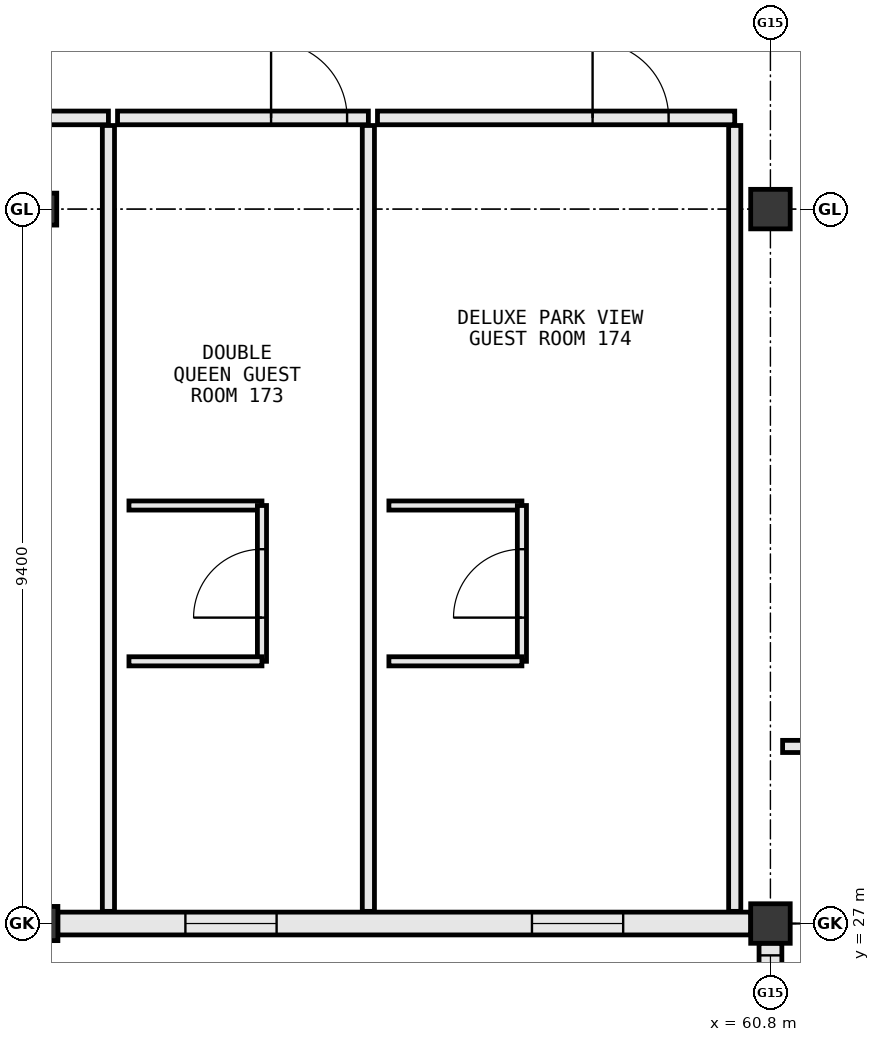
"""IFC4 building model, lengths in metres.
Left out: names, types, materials, properties, quantities, classifications, styles, units other than length and angle.
Written with IfcOpenShell. Run it as: python <this file> out.ifc"""

import sys

from ifc_helpers import new_model, si_unit, direction, frame, frame_2d, origin, origin_2d, place, context, subcontext, project, spatial, rectangle, extrude, element, fill, save


model = new_model("IFC4")
c1 = context("Model", 3, precision=1e-05, world=origin(), true_north=direction((0.0, 1.0)))
c2 = subcontext(c1, "Body", "Model", "MODEL_VIEW")
j1 = project(units=[si_unit("LENGTHUNIT", "METRE"), si_unit("PLANEANGLEUNIT", "RADIAN")], contexts=[c1])
p1 = place(None, origin())
s1 = spatial("IfcSite", under=j1, at=p1, CompositionType="ELEMENT")
p2 = place(p1, origin())
s2 = spatial("IfcBuilding", under=s1, at=p2, CompositionType="ELEMENT")
p3 = place(p2, frame((0.0, 0.0, 23.8)))
s3 = spatial("IfcBuildingStorey", under=s2, at=p3, CompositionType="ELEMENT", Elevation=23.8)
for number, where, z_axis, x_axis in (
    (1, (60.8, 27.0, 0.0), (0.0, 0.0, 1.0), (1.0, 0.0, 0.0)),
    (2, (60.8, 36.4, 0.0), (0.0, 0.0, 1.0), (1.0, 0.0, 0.0)),
):
    element("IfcColumn", number, at=place(p3, frame(where, z_axis=z_axis, x_axis=x_axis)), inside=s3, PredefinedType="COLUMN", context=c2, shape_type="SweptSolid", body=[
        extrude(rectangle(XDim=0.52, YDim=0.52, at=origin_2d()), origin(), (0.0, 0.0, 1.0), 3.8),
    ])
p4 = place(p3, frame((51.2, 27.0, 0.0), z_axis=(0.0, 0.0, 1.0), x_axis=(1.0, 0.0, 0.0)))
e3 = element("IfcColumn", 3, at=p4, inside=s3, PredefinedType="COLUMN", context=c2, shape_type="SweptSolid", body=[
    extrude(rectangle(XDim=0.45, YDim=0.45, at=origin_2d()), origin(), (0.0, 0.0, 1.0), 3.8),
])
p5 = place(p3, frame((51.2, 36.4, 0.0), z_axis=(0.0, 0.0, 1.0), x_axis=(1.0, 0.0, 0.0)))
e4 = element("IfcColumn", 4, at=p5, inside=s3, PredefinedType="COLUMN", context=c2, shape_type="SweptSolid", body=[
    extrude(rectangle(XDim=0.42, YDim=0.42, at=origin_2d()), origin(), (0.0, 0.0, 1.0), 3.8),
])
p6 = place(p3, frame((51.423, 27.0, 0.0), z_axis=(0.0, 0.0, 1.0), x_axis=(1.0, 0.0, 0.0)))
e5 = element("IfcWall", 5, at=p6, inside=s3, PredefinedType="STANDARD", context=c2, shape_type="SweptSolid", body=[
    extrude(rectangle(XDim=9.119, YDim=0.3, at=frame_2d((4.56, 0.0))), origin(), (0.0, 0.0, 1.0), 2.785),
])
p7 = place(p6, frame((1.68, 0.0, 0.85)))
e6 = element("IfcOpeningElement", 6, at=p7, cuts=e5, PredefinedType="OPENING", context=c2, shape_type="SweptSolid", body=[
    extrude(rectangle(XDim=1.2, YDim=1.55, at=frame_2d((0.6, 0.775))), frame((0.0, 0.162, 0.0), z_axis=(0.0, -1.0, 0.0), x_axis=(1.0, 0.0, 0.0)), (0.0, 0.0, 1.0), 0.324),
])
p8 = place(p6, frame((6.239, 0.0, 0.85)))
e7 = element("IfcOpeningElement", 7, at=p8, cuts=e5, PredefinedType="OPENING", context=c2, shape_type="SweptSolid", body=[
    extrude(rectangle(XDim=1.2, YDim=1.55, at=frame_2d((0.6, 0.775))), frame((0.0, 0.162, 0.0), z_axis=(0.0, -1.0, 0.0), x_axis=(1.0, 0.0, 0.0)), (0.0, 0.0, 1.0), 0.324),
])
p9 = place(p3, frame((60.8, 26.742, 0.0), z_axis=(0.0, 0.0, 1.0), x_axis=(0.0, -1.0, 0.0)))
e8 = element("IfcWall", 8, at=p9, inside=s3, PredefinedType="STANDARD", context=c2, shape_type="SweptSolid", body=[
    extrude(rectangle(XDim=7.884, YDim=0.3, at=frame_2d((3.942, 0.0))), origin(), (0.0, 0.0, 1.0), 3.005),
])
p10 = place(p9, frame((5.498, 0.0, 0.85)))
e9 = element("IfcOpeningElement", 9, at=p10, cuts=e8, PredefinedType="OPENING", context=c2, shape_type="SweptSolid", body=[
    extrude(rectangle(XDim=1.8, YDim=1.85, at=frame_2d((0.9, 0.925))), frame((0.0, 0.162, 0.0), z_axis=(0.0, -1.0, 0.0), x_axis=(1.0, 0.0, 0.0)), (0.0, 0.0, 1.0), 0.324),
])
p11 = place(p9, frame((2.242, 0.0, 0.85)))
e10 = element("IfcOpeningElement", 10, at=p11, cuts=e8, PredefinedType="OPENING", context=c2, shape_type="SweptSolid", body=[
    extrude(rectangle(XDim=1.8, YDim=1.85, at=frame_2d((0.9, 0.925))), frame((0.0, 0.162, 0.0), z_axis=(0.0, -1.0, 0.0), x_axis=(1.0, 0.0, 0.0)), (0.0, 0.0, 1.0), 0.324),
])
p12 = place(p9, frame((0.161, 0.0, 0.85)))
e11 = element("IfcOpeningElement", 11, at=p12, cuts=e8, PredefinedType="OPENING", context=c2, shape_type="SweptSolid", body=[
    extrude(rectangle(XDim=1.05, YDim=1.45, at=frame_2d((0.525, 0.725))), frame((0.0, 0.162, 0.0), z_axis=(0.0, -1.0, 0.0), x_axis=(1.0, 0.0, 0.0)), (0.0, 0.0, 1.0), 0.324),
])
p13 = place(p3, frame((60.96, 29.33, 0.0), z_axis=(0.0, 0.0, 1.0), x_axis=(1.0, 0.0, 0.0)))
e12 = element("IfcWall", 12, at=p13, inside=s3, PredefinedType="PARTITIONING", context=c2, shape_type="SweptSolid", body=[
    extrude(rectangle(XDim=6.94, YDim=0.16, at=frame_2d((3.47, 0.0))), origin(), (0.0, 0.0, 1.0), 3.55),
])
p14 = place(p3, frame((52.09, 37.6, 0.0), z_axis=(0.0, 0.0, 1.0), x_axis=(-1.0, 0.0, 0.0)))
e13 = element("IfcWall", 13, at=p14, inside=s3, PredefinedType="PARTITIONING", context=c2, shape_type="SweptSolid", body=[
    extrude(rectangle(XDim=3.3, YDim=0.18, at=frame_2d((1.65, 0.0))), origin(), (0.0, 0.0, 1.0), 3.55),
])
p15 = place(p14, frame((1.717, 0.0, 0.0)))
e14 = element("IfcOpeningElement", 14, at=p15, cuts=e13, PredefinedType="OPENING", context=c2, shape_type="SweptSolid", body=[
    extrude(rectangle(XDim=1.0, YDim=2.2, at=frame_2d((0.5, 1.1))), frame((0.0, 0.102, 0.0), z_axis=(0.0, -1.0, 0.0), x_axis=(1.0, 0.0, 0.0)), (0.0, 0.0, 1.0), 0.204),
])
p16 = place(p3, frame((52.09, 27.16, 0.0), z_axis=(0.0, 0.0, 1.0), x_axis=(0.0, 1.0, 0.0)))
e15 = element("IfcWall", 15, at=p16, inside=s3, PredefinedType="PARTITIONING", context=c2, shape_type="SweptSolid", body=[
    extrude(rectangle(XDim=10.34, YDim=0.16, at=frame_2d((5.17, 0.0))), origin(), (0.0, 0.0, 1.0), 3.55),
])
p17 = place(p3, frame((55.51, 37.6, 0.0), z_axis=(0.0, 0.0, 1.0), x_axis=(-1.0, 0.0, 0.0)))
e16 = element("IfcWall", 16, at=p17, inside=s3, PredefinedType="PARTITIONING", context=c2, shape_type="SweptSolid", body=[
    extrude(rectangle(XDim=3.3, YDim=0.18, at=frame_2d((1.65, 0.0))), origin(), (0.0, 0.0, 1.0), 3.55),
])
p18 = place(p17, frame((0.28, 0.0, 0.0)))
e17 = element("IfcOpeningElement", 17, at=p18, cuts=e16, PredefinedType="OPENING", context=c2, shape_type="SweptSolid", body=[
    extrude(rectangle(XDim=1.0, YDim=2.2, at=frame_2d((0.5, 1.1))), frame((0.0, 0.102, 0.0), z_axis=(0.0, -1.0, 0.0), x_axis=(1.0, 0.0, 0.0)), (0.0, 0.0, 1.0), 0.204),
])
p19 = place(p3, frame((55.51, 27.16, 0.0), z_axis=(0.0, 0.0, 1.0), x_axis=(0.0, 1.0, 0.0)))
e18 = element("IfcWall", 18, at=p19, inside=s3, PredefinedType="PARTITIONING", context=c2, shape_type="SweptSolid", body=[
    extrude(rectangle(XDim=10.34, YDim=0.16, at=frame_2d((5.17, 0.0))), origin(), (0.0, 0.0, 1.0), 3.55),
])
p20 = place(p3, frame((52.36, 32.5, 0.0), z_axis=(0.0, 0.0, 1.0), x_axis=(1.0, 0.0, 0.0)))
e19 = element("IfcWall", 19, at=p20, inside=s3, PredefinedType="PARTITIONING", context=c2, shape_type="SweptSolid", body=[
    extrude(rectangle(XDim=1.75, YDim=0.12, at=frame_2d((0.875, 0.0))), origin(), (0.0, 0.0, 1.0), 3.55),
])
p21 = place(p3, frame((54.11, 30.45, 0.0), z_axis=(0.0, 0.0, 1.0), x_axis=(0.0, 1.0, 0.0)))
e20 = element("IfcWall", 20, at=p21, inside=s3, PredefinedType="PARTITIONING", context=c2, shape_type="SweptSolid", body=[
    extrude(rectangle(XDim=2.05, YDim=0.12, at=frame_2d((1.025, 0.0))), origin(), (0.0, 0.0, 1.0), 3.095),
])
p22 = place(p21, frame((0.575, 0.0, 0.0)))
e21 = element("IfcOpeningElement", 21, at=p22, cuts=e20, PredefinedType="OPENING", context=c2, shape_type="SweptSolid", body=[
    extrude(rectangle(XDim=0.9, YDim=2.15, at=frame_2d((0.45, 1.075))), frame((0.0, 0.072, 0.0), z_axis=(0.0, -1.0, 0.0), x_axis=(1.0, 0.0, 0.0)), (0.0, 0.0, 1.0), 0.144),
])
p23 = place(p3, frame((52.36, 30.45, 0.0), z_axis=(0.0, 0.0, 1.0), x_axis=(1.0, 0.0, 0.0)))
e22 = element("IfcWall", 22, at=p23, inside=s3, PredefinedType="PARTITIONING", context=c2, shape_type="SweptSolid", body=[
    extrude(rectangle(XDim=1.75, YDim=0.12, at=frame_2d((0.875, 0.0))), origin(), (0.0, 0.0, 1.0), 3.55),
])
p24 = place(p3, frame((60.33, 37.6, 0.0), z_axis=(0.0, 0.0, 1.0), x_axis=(-1.0, 0.0, 0.0)))
e23 = element("IfcWall", 23, at=p24, inside=s3, PredefinedType="PARTITIONING", context=c2, shape_type="SweptSolid", body=[
    extrude(rectangle(XDim=4.7, YDim=0.18, at=frame_2d((2.35, 0.0))), origin(), (0.0, 0.0, 1.0), 3.55),
])
p25 = place(p24, frame((0.87, 0.0, 0.0)))
e24 = element("IfcOpeningElement", 24, at=p25, cuts=e23, PredefinedType="OPENING", context=c2, shape_type="SweptSolid", body=[
    extrude(rectangle(XDim=1.0, YDim=2.2, at=frame_2d((0.5, 1.1))), frame((0.0, 0.102, 0.0), z_axis=(0.0, -1.0, 0.0), x_axis=(1.0, 0.0, 0.0)), (0.0, 0.0, 1.0), 0.204),
])
p26 = place(p3, frame((60.33, 27.16, 0.0), z_axis=(0.0, 0.0, 1.0), x_axis=(0.0, 1.0, 0.0)))
e25 = element("IfcWall", 25, at=p26, inside=s3, PredefinedType="PARTITIONING", context=c2, shape_type="SweptSolid", body=[
    extrude(rectangle(XDim=10.34, YDim=0.16, at=frame_2d((5.17, 0.0))), origin(), (0.0, 0.0, 1.0), 3.55),
])
p27 = place(p3, frame((55.78, 32.5, 0.0), z_axis=(0.0, 0.0, 1.0), x_axis=(1.0, 0.0, 0.0)))
e26 = element("IfcWall", 26, at=p27, inside=s3, PredefinedType="PARTITIONING", context=c2, shape_type="SweptSolid", body=[
    extrude(rectangle(XDim=1.75, YDim=0.12, at=frame_2d((0.875, 0.0))), origin(), (0.0, 0.0, 1.0), 3.55),
])
p28 = place(p3, frame((57.53, 30.45, 0.0), z_axis=(0.0, 0.0, 1.0), x_axis=(0.0, 1.0, 0.0)))
e27 = element("IfcWall", 27, at=p28, inside=s3, PredefinedType="PARTITIONING", context=c2, shape_type="SweptSolid", body=[
    extrude(rectangle(XDim=2.05, YDim=0.12, at=frame_2d((1.025, 0.0))), origin(), (0.0, 0.0, 1.0), 3.095),
])
p29 = place(p28, frame((0.575, 0.0, 0.0)))
e28 = element("IfcOpeningElement", 28, at=p29, cuts=e27, PredefinedType="OPENING", context=c2, shape_type="SweptSolid", body=[
    extrude(rectangle(XDim=0.9, YDim=2.15, at=frame_2d((0.45, 1.075))), frame((0.0, 0.072, 0.0), z_axis=(0.0, -1.0, 0.0), x_axis=(1.0, 0.0, 0.0)), (0.0, 0.0, 1.0), 0.144),
])
p30 = place(p3, frame((55.78, 30.45, 0.0), z_axis=(0.0, 0.0, 1.0), x_axis=(1.0, 0.0, 0.0)))
e29 = element("IfcWall", 29, at=p30, inside=s3, PredefinedType="PARTITIONING", context=c2, shape_type="SweptSolid", body=[
    extrude(rectangle(XDim=1.75, YDim=0.12, at=frame_2d((0.875, 0.0))), origin(), (0.0, 0.0, 1.0), 3.55),
])
p31 = place(p7, origin())
e30 = element("IfcWindow", 30, at=p31, inside=s3, PartitioningType="SINGLE_PANEL", PredefinedType="WINDOW", context=c2, shape_type="SweptSolid", body=[
    extrude(rectangle(XDim=1.2, YDim=1.55, at=frame_2d((0.6, 0.775))), frame((0.0, 0.03, 0.0), z_axis=(0.0, -1.0, 0.0), x_axis=(1.0, 0.0, 0.0)), (0.0, 0.0, 1.0), 0.06),
])
fill(e6, e30)
p32 = place(p8, origin())
e31 = element("IfcWindow", 31, at=p32, inside=s3, PartitioningType="SINGLE_PANEL", PredefinedType="WINDOW", context=c2, shape_type="SweptSolid", body=[
    extrude(rectangle(XDim=1.2, YDim=1.55, at=frame_2d((0.6, 0.775))), frame((0.0, 0.03, 0.0), z_axis=(0.0, -1.0, 0.0), x_axis=(1.0, 0.0, 0.0)), (0.0, 0.0, 1.0), 0.06),
])
fill(e7, e31)
p33 = place(p12, origin())
e32 = element("IfcWindow", 32, at=p33, inside=s3, PartitioningType="SINGLE_PANEL", PredefinedType="WINDOW", context=c2, shape_type="SweptSolid", body=[
    extrude(rectangle(XDim=1.05, YDim=1.45, at=frame_2d((0.525, 0.725))), frame((0.0, 0.03, 0.0), z_axis=(0.0, -1.0, 0.0), x_axis=(1.0, 0.0, 0.0)), (0.0, 0.0, 1.0), 0.06),
])
fill(e11, e32)
p34 = place(p18, frame((1.0, 0.0, 0.0), z_axis=(0.0, 0.0, 1.0), x_axis=(-1.0, 0.0, 0.0)))
e33 = element("IfcDoor", 33, at=p34, inside=s3, OperationType="SINGLE_SWING_RIGHT", PredefinedType="DOOR", context=c2, shape_type="SweptSolid", body=[
    extrude(rectangle(XDim=1.0, YDim=2.2, at=frame_2d((0.5, 1.1))), frame((0.0, 0.025, 0.0), z_axis=(0.0, -1.0, 0.0), x_axis=(1.0, 0.0, 0.0)), (0.0, 0.0, 1.0), 0.05),
])
fill(e17, e33)
p35 = place(p22, origin())
e34 = element("IfcDoor", 34, at=p35, inside=s3, OperationType="SINGLE_SWING_LEFT", PredefinedType="DOOR", context=c2, shape_type="SweptSolid", body=[
    extrude(rectangle(XDim=0.9, YDim=2.15, at=frame_2d((0.45, 1.075))), frame((0.0, 0.025, 0.0), z_axis=(0.0, -1.0, 0.0), x_axis=(1.0, 0.0, 0.0)), (0.0, 0.0, 1.0), 0.05),
])
fill(e21, e34)
p36 = place(p25, frame((1.0, 0.0, 0.0), z_axis=(0.0, 0.0, 1.0), x_axis=(-1.0, 0.0, 0.0)))
e35 = element("IfcDoor", 35, at=p36, inside=s3, OperationType="SINGLE_SWING_RIGHT", PredefinedType="DOOR", context=c2, shape_type="SweptSolid", body=[
    extrude(rectangle(XDim=1.0, YDim=2.2, at=frame_2d((0.5, 1.1))), frame((0.0, 0.025, 0.0), z_axis=(0.0, -1.0, 0.0), x_axis=(1.0, 0.0, 0.0)), (0.0, 0.0, 1.0), 0.05),
])
fill(e24, e35)
p37 = place(p29, origin())
e36 = element("IfcDoor", 36, at=p37, inside=s3, OperationType="SINGLE_SWING_LEFT", PredefinedType="DOOR", context=c2, shape_type="SweptSolid", body=[
    extrude(rectangle(XDim=0.9, YDim=2.15, at=frame_2d((0.45, 1.075))), frame((0.0, 0.025, 0.0), z_axis=(0.0, -1.0, 0.0), x_axis=(1.0, 0.0, 0.0)), (0.0, 0.0, 1.0), 0.05),
])
fill(e28, e36)
save(model, sys.argv[1])
